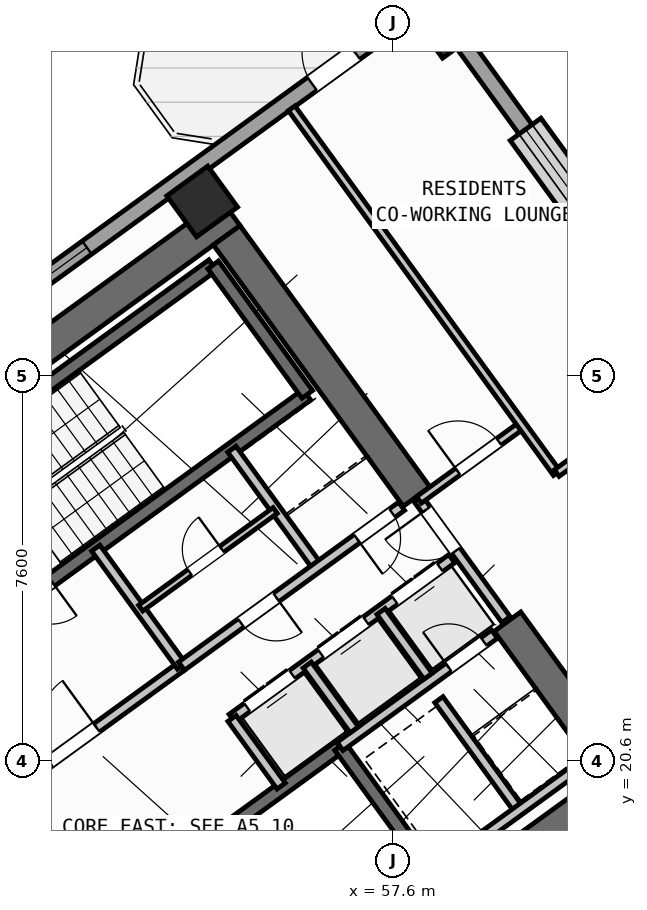
"""IFC4 building model, lengths in metres.
Left out: names, types, materials, properties, quantities, classifications, styles, units other than length and angle.
Written with IfcOpenShell. Run it as: python <this file> out.ifc"""

import sys

from ifc_helpers import new_model, si_unit, direction, frame, frame_2d, origin, origin_2d, place, context, subcontext, project, spatial, rectangle, hollow_rectangle, extrude, source, transform, mapped, element, fill, save


model = new_model("IFC4")
c1 = context("Model", 3, precision=1e-05, world=origin(), true_north=direction((0.0, 1.0)))
c2 = subcontext(c1, "Body", "Model", "MODEL_VIEW")
j1 = project(units=[si_unit("LENGTHUNIT", "METRE"), si_unit("PLANEANGLEUNIT", "RADIAN")], contexts=[c1])
p1 = place(None, origin())
s1 = spatial("IfcSite", under=j1, at=p1, CompositionType="ELEMENT")
p2 = place(p1, origin())
s2 = spatial("IfcBuilding", under=s1, at=p2, CompositionType="ELEMENT")
p3 = place(p2, frame((0.0, 0.0, 31.2)))
s3 = spatial("IfcBuildingStorey", under=s2, at=p3, CompositionType="ELEMENT", Elevation=31.2)
p4 = place(p3, frame((52.318, 13.11, 0.0), z_axis=(0.0, 0.0, 1.0), x_axis=(0.809019445368, 0.587781878776, 0.0)))
e1 = element("IfcWall", 1, at=p4, inside=s3, PredefinedType="SHEAR", context=c2, shape_type="SweptSolid", body=[
    extrude(rectangle(XDim=12.44, YDim=0.65, at=frame_2d((6.22, 0.0))), origin(), (0.0, 0.0, 1.0), 3.35),
])
p5 = place(p3, frame((44.325, 24.113, 0.0), z_axis=(0.0, 0.0, 1.0), x_axis=(0.809012664862, 0.58779121131, 0.0)))
e2 = element("IfcWall", 2, at=p5, inside=s3, PredefinedType="SHEAR", context=c2, shape_type="SweptSolid", body=[
    extrude(rectangle(XDim=12.44, YDim=0.65, at=frame_2d((6.22, 0.0))), origin(), (0.0, 0.0, 1.0), 3.35),
])
p6 = place(p3, frame((61.929, 20.494, 0.0), z_axis=(0.0, 0.0, 1.0), x_axis=(-0.58782982593, 0.808984607855, 0.0)))
e3 = element("IfcWall", 3, at=p6, inside=s3, PredefinedType="SHEAR", context=c2, shape_type="SweptSolid", body=[
    extrude(rectangle(XDim=3.525, YDim=0.65, at=frame_2d((1.762, 0.0))), origin(), (0.0, 0.0, 1.0), 3.35),
])
p7 = place(p3, frame((58.064, 25.813, 0.0), z_axis=(0.0, 0.0, 1.0), x_axis=(-0.58777996584, 0.809020835181, 0.0)))
e4 = element("IfcWall", 4, at=p7, inside=s3, PredefinedType="SHEAR", context=c2, shape_type="SweptSolid", body=[
    extrude(rectangle(XDim=6.375, YDim=0.65, at=frame_2d((3.188, 0.0))), origin(), (0.0, 0.0, 1.0), 3.35),
])
m1 = source(origin(), c2, "Body", "SweptSolid", [
    extrude(hollow_rectangle(XDim=1.0, YDim=1.0, WallThickness=0.04, at=origin_2d()), origin(), (0.0, 0.0, 1.0), 3.6),
])
for number, where, z_axis, x_axis in (
    (5, (53.832, 31.638, 0.0), (0.0, 0.0, 1.0), (0.809, 0.588, 0.0)),
    (6, (58.686, 35.165, 0.0), (0.0, 0.0, 1.0), (0.809, 0.588, 0.0)),
):
    element("IfcColumn", number, at=place(p3, frame(where, z_axis=z_axis, x_axis=x_axis)), inside=s3, PredefinedType="COLUMN", context=c2, shape_type="MappedRepresentation", body=[
        mapped(m1, transform((0.0, 0.0, 0.0), scale=1.0)),
    ])
p8 = place(p3, frame((43.938, 25.192, 0.0), z_axis=(0.0, 0.0, 1.0), x_axis=(0.809016324578, 0.587786174187, 0.0)))
e7 = element("IfcWall", 7, at=p8, inside=s3, PredefinedType="STANDARD", context=c2, shape_type="SweptSolid", body=[
    extrude(rectangle(XDim=17.587, YDim=0.32, at=frame_2d((8.794, 0.0))), origin(), (0.0, 0.0, 1.0), 3.35),
])
p9 = place(p8, frame((14.914, 0.0, 0.0)))
e8 = element("IfcOpeningElement", 8, at=p9, cuts=e7, PredefinedType="OPENING", context=c2, shape_type="SweptSolid", body=[
    extrude(rectangle(XDim=1.05, YDim=2.15, at=frame_2d((0.525, 1.075))), frame((0.0, 0.17, 0.0), z_axis=(0.0, -1.0, 0.0), x_axis=(1.0, 0.0, 0.0)), (0.0, 0.0, 1.0), 0.34),
])
p10 = place(p8, frame((2.169, 0.0, 0.8)))
e9 = element("IfcOpeningElement", 9, at=p10, cuts=e7, PredefinedType="OPENING", context=c2, shape_type="SweptSolid", body=[
    extrude(rectangle(XDim=2.1, YDim=1.55, at=frame_2d((1.05, 0.775))), frame((0.0, 0.17, 0.0), z_axis=(0.0, -1.0, 0.0), x_axis=(1.0, 0.0, 0.0)), (0.0, 0.0, 1.0), 0.34),
])
p11 = place(p8, frame((7.319, 0.0, 0.8)))
e10 = element("IfcOpeningElement", 10, at=p11, cuts=e7, PredefinedType="OPENING", context=c2, shape_type="SweptSolid", body=[
    extrude(rectangle(XDim=2.1, YDim=1.55, at=frame_2d((1.05, 0.775))), frame((0.0, 0.17, 0.0), z_axis=(0.0, -1.0, 0.0), x_axis=(1.0, 0.0, 0.0)), (0.0, 0.0, 1.0), 0.34),
])
p12 = place(p3, frame((58.455, 35.484, 0.0), z_axis=(0.0, 0.0, 1.0), x_axis=(0.587783625747, -0.809018176127, 0.0)))
e11 = element("IfcWall", 11, at=p12, inside=s3, PredefinedType="STANDARD", context=c2, shape_type="SweptSolid", body=[
    extrude(rectangle(XDim=21.587, YDim=0.32, at=frame_2d((10.794, 0.0))), origin(), (0.0, 0.0, 1.0), 2.725),
])
p13 = place(p12, frame((2.994, 0.0, 0.8)))
e12 = element("IfcOpeningElement", 12, at=p13, cuts=e11, PredefinedType="OPENING", context=c2, shape_type="SweptSolid", body=[
    extrude(rectangle(XDim=2.1, YDim=1.55, at=frame_2d((1.05, 0.775))), frame((0.0, 0.17, 0.0), z_axis=(0.0, -1.0, 0.0), x_axis=(1.0, 0.0, 0.0)), (0.0, 0.0, 1.0), 0.34),
])
p14 = place(p12, frame((11.934, 0.0, 0.85)))
e13 = element("IfcOpeningElement", 13, at=p14, cuts=e11, PredefinedType="OPENING", context=c2, shape_type="SweptSolid", body=[
    extrude(rectangle(XDim=1.8, YDim=1.5, at=frame_2d((0.9, 0.75))), frame((0.0, 0.17, 0.0), z_axis=(0.0, -1.0, 0.0), x_axis=(1.0, 0.0, 0.0)), (0.0, 0.0, 1.0), 0.34),
])
p15 = place(p12, frame((18.535, 0.0, 0.85)))
e14 = element("IfcOpeningElement", 14, at=p15, cuts=e11, PredefinedType="OPENING", context=c2, shape_type="SweptSolid", body=[
    extrude(rectangle(XDim=1.5, YDim=1.5, at=frame_2d((0.75, 0.75))), frame((0.0, 0.17, 0.0), z_axis=(0.0, -1.0, 0.0), x_axis=(1.0, 0.0, 0.0)), (0.0, 0.0, 1.0), 0.34),
])
p16 = place(p3, frame((48.006, 25.996, 0.0), z_axis=(0.0, 0.0, 1.0), x_axis=(0.80901903764, 0.587782439969, 0.0)))
e15 = element("IfcWall", 15, at=p16, inside=s3, PredefinedType="SHEAR", context=c2, shape_type="SweptSolid", body=[
    extrude(rectangle(XDim=7.46, YDim=0.26, at=frame_2d((3.73, 0.0))), origin(), (0.0, 0.0, 1.0), 3.35),
])
p17 = place(p3, frame((49.863, 23.44, 0.0), z_axis=(0.0, 0.0, 1.0), x_axis=(0.809003474932, 0.587803859759, 0.0)))
e16 = element("IfcWall", 16, at=p17, inside=s3, PredefinedType="SHEAR", context=c2, shape_type="SweptSolid", body=[
    extrude(rectangle(XDim=7.46, YDim=0.26, at=frame_2d((3.73, 0.0))), origin(), (0.0, 0.0, 1.0), 3.35),
])
p18 = place(p17, frame((0.36, 0.0, 0.0)))
e17 = element("IfcOpeningElement", 17, at=p18, cuts=e16, PredefinedType="OPENING", context=c2, shape_type="SweptSolid", body=[
    extrude(rectangle(XDim=0.86, YDim=2.05, at=frame_2d((0.43, 1.025))), frame((0.0, 0.14, 0.0), z_axis=(0.0, -1.0, 0.0), x_axis=(1.0, 0.0, 0.0)), (0.0, 0.0, 1.0), 0.28),
])
p19 = place(p3, frame((55.906, 27.831, 0.0), z_axis=(0.0, 0.0, 1.0), x_axis=(-0.587804123638, 0.809003283204, 0.0)))
e18 = element("IfcWall", 18, at=p19, inside=s3, PredefinedType="SHEAR", context=c2, shape_type="SweptSolid", body=[
    extrude(rectangle(XDim=3.16, YDim=0.26, at=frame_2d((1.58, 0.0))), origin(), (0.0, 0.0, 1.0), 3.35),
])
p20 = place(p3, frame((50.615, 16.57, 0.0), z_axis=(0.0, 0.0, 1.0), x_axis=(0.809028366311, 0.587769599847, 0.0)))
e19 = element("IfcWall", 19, at=p20, inside=s3, PredefinedType="SHEAR", context=c2, shape_type="SweptSolid", body=[
    extrude(rectangle(XDim=7.33, YDim=0.26, at=frame_2d((3.665, 0.0))), origin(), (0.0, 0.0, 1.0), 3.35),
])
p21 = place(p20, frame((0.22, 0.0, 0.0)))
e20 = element("IfcOpeningElement", 20, at=p21, cuts=e19, PredefinedType="OPENING", context=c2, shape_type="SweptSolid", body=[
    extrude(rectangle(XDim=1.1, YDim=2.1, at=frame_2d((0.55, 1.05))), frame((0.0, 0.14, 0.0), z_axis=(0.0, -1.0, 0.0), x_axis=(1.0, 0.0, 0.0)), (0.0, 0.0, 1.0), 0.28),
])
p22 = place(p3, frame((58.41, 18.327, 0.0), z_axis=(0.0, 0.0, 1.0), x_axis=(-0.58776738483, 0.809029975545, 0.0)))
e21 = element("IfcWall", 21, at=p22, inside=s3, PredefinedType="SHEAR", context=c2, shape_type="SweptSolid", body=[
    extrude(rectangle(XDim=3.16, YDim=0.26, at=frame_2d((1.58, 0.0))), origin(), (0.0, 0.0, 1.0), 3.35),
])
p23 = place(p3, frame((48.799, 19.107, 0.0), z_axis=(0.0, 0.0, 1.0), x_axis=(0.809012959416, 0.587790805897, 0.0)))
e22 = element("IfcWall", 22, at=p23, inside=s3, PredefinedType="STANDARD", context=c2, shape_type="SweptSolid", body=[
    extrude(rectangle(XDim=5.718, YDim=0.2, at=frame_2d((2.859, 0.0))), origin(), (0.0, 0.0, 1.0), 3.34),
])
p24 = place(p23, frame((2.498, 0.0, 0.0)))
e23 = element("IfcOpeningElement", 23, at=p24, cuts=e22, PredefinedType="OPENING", context=c2, shape_type="SweptSolid", body=[
    extrude(rectangle(XDim=1.15, YDim=2.1, at=frame_2d((0.575, 1.05))), frame((0.0, 0.11, 0.0), z_axis=(0.0, -1.0, 0.0), x_axis=(1.0, 0.0, 0.0)), (0.0, 0.0, 1.0), 0.22),
])
p25 = place(p3, frame((56.553, 20.884, 0.0), z_axis=(0.0, 0.0, 1.0), x_axis=(0.809035789462, 0.587759382205, 0.0)))
e24 = element("IfcWall", 24, at=p25, inside=s3, PredefinedType="STANDARD", context=c2, shape_type="SweptSolid", body=[
    extrude(rectangle(XDim=3.768, YDim=0.2, at=frame_2d((1.884, 0.0))), origin(), (0.0, 0.0, 1.0), 3.34),
])
p26 = place(p25, frame((2.65, 0.0, 0.0)))
e25 = element("IfcOpeningElement", 25, at=p26, cuts=e24, PredefinedType="OPENING", context=c2, shape_type="SweptSolid", body=[
    extrude(rectangle(XDim=0.86, YDim=2.05, at=frame_2d((0.43, 1.025))), frame((0.0, 0.11, 0.0), z_axis=(0.0, -1.0, 0.0), x_axis=(1.0, 0.0, 0.0)), (0.0, 0.0, 1.0), 0.22),
])
p27 = place(p3, frame((54.421, 21.436, 0.0), z_axis=(0.0, 0.0, 1.0), x_axis=(0.809013710463, 0.587789772183, 0.0)))
e26 = element("IfcWall", 26, at=p27, inside=s3, PredefinedType="STANDARD", context=c2, shape_type="SweptSolid", body=[
    extrude(rectangle(XDim=5.36, YDim=0.2, at=frame_2d((2.68, 0.0))), origin(), (0.0, 0.0, 1.0), 3.34),
])
p28 = place(p27, frame((0.37, 0.0, 0.0)))
e27 = element("IfcOpeningElement", 27, at=p28, cuts=e26, PredefinedType="OPENING", context=c2, shape_type="SweptSolid", body=[
    extrude(rectangle(XDim=1.1, YDim=2.15, at=frame_2d((0.55, 1.075))), frame((0.0, 0.11, 0.0), z_axis=(0.0, -1.0, 0.0), x_axis=(1.0, 0.0, 0.0)), (0.0, 0.0, 1.0), 0.22),
])
p29 = place(p27, frame((2.17, 0.0, 0.0)))
e28 = element("IfcOpeningElement", 28, at=p29, cuts=e26, PredefinedType="OPENING", context=c2, shape_type="SweptSolid", body=[
    extrude(rectangle(XDim=1.1, YDim=2.15, at=frame_2d((0.55, 1.075))), frame((0.0, 0.11, 0.0), z_axis=(0.0, -1.0, 0.0), x_axis=(1.0, 0.0, 0.0)), (0.0, 0.0, 1.0), 0.22),
])
p30 = place(p27, frame((3.97, 0.0, 0.0)))
e29 = element("IfcOpeningElement", 29, at=p30, cuts=e26, PredefinedType="OPENING", context=c2, shape_type="SweptSolid", body=[
    extrude(rectangle(XDim=1.1, YDim=2.15, at=frame_2d((0.55, 1.075))), frame((0.0, 0.11, 0.0), z_axis=(0.0, -1.0, 0.0), x_axis=(1.0, 0.0, 0.0)), (0.0, 0.0, 1.0), 0.22),
])
p31 = place(p3, frame((55.391, 20.102, 0.0), z_axis=(0.0, 0.0, 1.0), x_axis=(-0.58778447739, 0.809017557374, 0.0)))
e30 = element("IfcWall", 30, at=p31, inside=s3, PredefinedType="STANDARD", context=c2, shape_type="SweptSolid", body=[
    extrude(rectangle(XDim=1.65, YDim=0.2, at=frame_2d((0.825, 0.0))), origin(), (0.0, 0.0, 1.0), 3.34),
])
p32 = place(p3, frame((56.834, 21.212, 0.0), z_axis=(0.0, 0.0, 1.0), x_axis=(-0.58776738483, 0.809029975545, 0.0)))
e31 = element("IfcWall", 31, at=p32, inside=s3, PredefinedType="STANDARD", context=c2, shape_type="SweptSolid", body=[
    extrude(rectangle(XDim=1.58, YDim=0.2, at=frame_2d((0.79, 0.0))), origin(), (0.0, 0.0, 1.0), 3.34),
])
p33 = place(p3, frame((58.29, 22.27, 0.0), z_axis=(0.0, 0.0, 1.0), x_axis=(-0.587840865826, 0.808976585857, 0.0)))
e32 = element("IfcWall", 32, at=p33, inside=s3, PredefinedType="STANDARD", context=c2, shape_type="SweptSolid", body=[
    extrude(rectangle(XDim=1.58, YDim=0.2, at=frame_2d((0.79, 0.0))), origin(), (0.0, 0.0, 1.0), 3.34),
])
p34 = place(p3, frame((60.067, 19.655, 0.0), z_axis=(0.0, 0.0, 1.0), x_axis=(-0.587800520745, 0.809005900975, 0.0)))
e33 = element("IfcWall", 33, at=p34, inside=s3, PredefinedType="STANDARD", context=c2, shape_type="SweptSolid", body=[
    extrude(rectangle(XDim=2.66, YDim=0.2, at=frame_2d((1.33, 0.0))), origin(), (0.0, 0.0, 1.0), 3.34),
])
p35 = place(p3, frame((58.472, 18.447, 0.0), z_axis=(0.0, 0.0, 1.0), x_axis=(0.809022487728, 0.587777691266, 0.0)))
e34 = element("IfcWall", 34, at=p35, inside=s3, PredefinedType="STANDARD", context=c2, shape_type="SweptSolid", body=[
    extrude(rectangle(XDim=3.648, YDim=0.2, at=frame_2d((1.824, 0.0))), origin(), (0.0, 0.0, 1.0), 3.34),
])
p36 = place(p3, frame((53.425, 22.468, 0.0), z_axis=(0.0, 0.0, 1.0), x_axis=(-0.5877230039, 0.809062216821, 0.0)))
e35 = element("IfcWall", 35, at=p36, inside=s3, PredefinedType="STANDARD", context=c2, shape_type="SweptSolid", body=[
    extrude(rectangle(XDim=2.88, YDim=0.2, at=frame_2d((1.44, 0.0))), origin(), (0.0, 0.0, 1.0), 3.34),
])
p37 = place(p3, frame((56.111, 24.419, 0.0), z_axis=(0.0, 0.0, 1.0), x_axis=(-0.58777848983, 0.809021907548, 0.0)))
e36 = element("IfcWall", 36, at=p37, inside=s3, PredefinedType="STANDARD", context=c2, shape_type="SweptSolid", body=[
    extrude(rectangle(XDim=2.88, YDim=0.2, at=frame_2d((1.44, 0.0))), origin(), (0.0, 0.0, 1.0), 3.34),
])
p38 = place(p3, frame((53.425, 22.468, 0.0), z_axis=(0.0, 0.0, 1.0), x_axis=(0.80902705128, 0.587771409902, 0.0)))
e37 = element("IfcWall", 37, at=p38, inside=s3, PredefinedType="STANDARD", context=c2, shape_type="SweptSolid", body=[
    extrude(rectangle(XDim=5.368, YDim=0.2, at=frame_2d((2.684, 0.0))), origin(), (0.0, 0.0, 1.0), 3.34),
])
p39 = place(p38, frame((4.28, 0.0, 0.0)))
e38 = element("IfcOpeningElement", 38, at=p39, cuts=e37, PredefinedType="OPENING", context=c2, shape_type="SweptSolid", body=[
    extrude(rectangle(XDim=0.86, YDim=2.05, at=frame_2d((0.43, 1.025))), frame((0.0, 0.11, 0.0), z_axis=(0.0, -1.0, 0.0), x_axis=(1.0, 0.0, 0.0)), (0.0, 0.0, 1.0), 0.22),
])
p40 = place(p38, frame((1.45, 0.0, 0.0)))
e39 = element("IfcOpeningElement", 39, at=p40, cuts=e37, PredefinedType="OPENING", context=c2, shape_type="SweptSolid", body=[
    extrude(rectangle(XDim=0.86, YDim=2.05, at=frame_2d((0.43, 1.025))), frame((0.0, 0.11, 0.0), z_axis=(0.0, -1.0, 0.0), x_axis=(1.0, 0.0, 0.0)), (0.0, 0.0, 1.0), 0.22),
])
p41 = place(p3, frame((52.618, 23.612, 0.0), z_axis=(0.0, 0.0, 1.0), x_axis=(0.809009587469, 0.587795446889, 0.0)))
e40 = element("IfcWall", 40, at=p41, inside=s3, PredefinedType="PLUMBINGWALL", context=c2, shape_type="SweptSolid", body=[
    extrude(rectangle(XDim=3.28, YDim=0.14, at=frame_2d((1.64, 0.0))), origin(), (0.0, 0.0, 1.0), 3.34),
])
p42 = place(p41, frame((1.2, 0.0, 0.0)))
e41 = element("IfcOpeningElement", 41, at=p42, cuts=e40, PredefinedType="OPENING", context=c2, shape_type="SweptSolid", body=[
    extrude(rectangle(XDim=0.78, YDim=2.05, at=frame_2d((0.39, 1.025))), frame((0.0, 0.08, 0.0), z_axis=(0.0, -1.0, 0.0), x_axis=(1.0, 0.0, 0.0)), (0.0, 0.0, 1.0), 0.16),
])
p43 = place(p3, frame((59.827, 23.386, 0.0), z_axis=(0.0, 0.0, 1.0), x_axis=(-0.587803840107, 0.809003489211, 0.0)))
e42 = element("IfcWall", 42, at=p43, inside=s3, PredefinedType="STANDARD", context=c2, shape_type="SweptSolid", body=[
    extrude(rectangle(XDim=2.96, YDim=0.2, at=frame_2d((1.48, 0.0))), origin(), (0.0, 0.0, 1.0), 3.34),
])
p44 = place(p43, frame((1.68, 0.0, 0.0)))
e43 = element("IfcOpeningElement", 43, at=p44, cuts=e42, PredefinedType="OPENING", context=c2, shape_type="SweptSolid", body=[
    extrude(rectangle(XDim=1.0, YDim=2.1, at=frame_2d((0.5, 1.05))), frame((0.0, 0.11, 0.0), z_axis=(0.0, -1.0, 0.0), x_axis=(1.0, 0.0, 0.0)), (0.0, 0.0, 1.0), 0.22),
])
p45 = place(p3, frame((58.111, 25.749, 0.0), z_axis=(0.0, 0.0, 1.0), x_axis=(0.809000999347, 0.58780726693, 0.0)))
e44 = element("IfcWall", 44, at=p45, inside=s3, PredefinedType="PARTITIONING", context=c2, shape_type="SweptSolid", body=[
    extrude(rectangle(XDim=2.51, YDim=0.16, at=frame_2d((1.255, 0.0))), origin(), (0.0, 0.0, 1.0), 2.725),
])
p46 = place(p45, frame((0.95, 0.0, 0.0)))
e45 = element("IfcOpeningElement", 45, at=p46, cuts=e44, PredefinedType="OPENING", context=c2, shape_type="SweptSolid", body=[
    extrude(rectangle(XDim=1.0, YDim=2.1, at=frame_2d((0.5, 1.05))), frame((0.0, 0.09, 0.0), z_axis=(0.0, -1.0, 0.0), x_axis=(1.0, 0.0, 0.0)), (0.0, 0.0, 1.0), 0.18),
])
p47 = place(p3, frame((60.829, 26.278, 0.0), z_axis=(0.0, 0.0, 1.0), x_axis=(-0.587781800813, 0.80901950201, 0.0)))
e46 = element("IfcWall", 46, at=p47, inside=s3, PredefinedType="PARTITIONING", context=c2, shape_type="SweptSolid", body=[
    extrude(rectangle(XDim=8.9, YDim=0.16, at=frame_2d((4.45, 0.0))), origin(), (0.0, 0.0, 1.0), 3.34),
])
p48 = place(p3, frame((60.829, 26.278, 0.0), z_axis=(0.0, 0.0, 1.0), x_axis=(0.809003564202, 0.587803736896, 0.0)))
e47 = element("IfcWall", 47, at=p48, inside=s3, PredefinedType="PARTITIONING", context=c2, shape_type="SweptSolid", body=[
    extrude(rectangle(XDim=3.63, YDim=0.16, at=frame_2d((1.815, 0.0))), origin(), (0.0, 0.0, 1.0), 3.34),
])
p49 = place(p48, frame((1.305, 0.0, 0.0)))
e48 = element("IfcOpeningElement", 48, at=p49, cuts=e47, PredefinedType="OPENING", context=c2, shape_type="SweptSolid", body=[
    extrude(rectangle(XDim=1.0, YDim=2.1, at=frame_2d((0.5, 1.05))), frame((0.0, 0.09, 0.0), z_axis=(0.0, -1.0, 0.0), x_axis=(1.0, 0.0, 0.0)), (0.0, 0.0, 1.0), 0.18),
])
p50 = place(p3, frame((53.705, 11.126, 0.0), z_axis=(0.0, 0.0, 1.0), x_axis=(0.809014504436, 0.587788679384, 0.0)))
e49 = element("IfcWall", 49, at=p50, inside=s3, PredefinedType="PARTITIONING", context=c2, shape_type="SweptSolid", body=[
    extrude(rectangle(XDim=14.67, YDim=0.16, at=frame_2d((7.335, 0.0))), origin(), (0.0, 0.0, 1.0), 3.34),
])
p51 = place(p50, frame((10.2, 0.0, 0.0)))
e50 = element("IfcOpeningElement", 50, at=p51, cuts=e49, PredefinedType="OPENING", context=c2, shape_type="SweptSolid", body=[
    extrude(rectangle(XDim=1.0, YDim=2.1, at=frame_2d((0.5, 1.05))), frame((0.0, 0.09, 0.0), z_axis=(0.0, -1.0, 0.0), x_axis=(1.0, 0.0, 0.0)), (0.0, 0.0, 1.0), 0.18),
])
m2 = source(origin(), c2, "Body", "SweptSolid", [
    extrude(rectangle(XDim=1.05, YDim=2.15, at=frame_2d((0.525, 1.075))), frame((0.0, 0.025, 0.0), z_axis=(0.0, -1.0, 0.0), x_axis=(1.0, 0.0, 0.0)), (0.0, 0.0, 1.0), 0.05),
])
p52 = place(p9, origin())
e51 = element("IfcDoor", 51, at=p52, inside=s3, OperationType="SINGLE_SWING_RIGHT", PredefinedType="DOOR", context=c2, shape_type="MappedRepresentation", body=[
    mapped(m2, transform((0.0, 0.0, 0.0), scale=1.0)),
])
fill(e8, e51)
m3 = source(origin(), c2, "Body", "SweptSolid", [
    extrude(rectangle(XDim=2.1, YDim=1.55, at=frame_2d((1.05, 0.775))), frame((0.0, 0.03, 0.0), z_axis=(0.0, -1.0, 0.0), x_axis=(1.0, 0.0, 0.0)), (0.0, 0.0, 1.0), 0.06),
])
p53 = place(p11, origin())
e52 = element("IfcWindow", 52, at=p53, inside=s3, PartitioningType="SINGLE_PANEL", PredefinedType="WINDOW", context=c2, shape_type="MappedRepresentation", body=[
    mapped(m3, transform((0.0, 0.0, 0.0), scale=1.0)),
])
fill(e10, e52)
p54 = place(p13, origin())
e53 = element("IfcWindow", 53, at=p54, inside=s3, PartitioningType="SINGLE_PANEL", PredefinedType="WINDOW", context=c2, shape_type="MappedRepresentation", body=[
    mapped(m3, transform((0.0, 0.0, 0.0), scale=1.0)),
])
fill(e12, e53)
m4 = source(origin(), c2, "Body", "SweptSolid", [
    extrude(rectangle(XDim=1.15, YDim=2.1, at=frame_2d((0.575, 1.05))), frame((0.0, 0.025, 0.0), z_axis=(0.0, -1.0, 0.0), x_axis=(1.0, 0.0, 0.0)), (0.0, 0.0, 1.0), 0.05),
])
p55 = place(p24, origin())
e54 = element("IfcDoor", 54, at=p55, inside=s3, OperationType="SINGLE_SWING_RIGHT", PredefinedType="DOOR", context=c2, shape_type="MappedRepresentation", body=[
    mapped(m4, transform((0.0, 0.0, 0.0), scale=1.0)),
])
fill(e23, e54)
m5 = source(origin(), c2, "Body", "SweptSolid", [
    extrude(rectangle(XDim=1.1, YDim=2.15, at=frame_2d((0.55, 1.075))), frame((0.0, 0.025, 0.0), z_axis=(0.0, -1.0, 0.0), x_axis=(1.0, 0.0, 0.0)), (0.0, 0.0, 1.0), 0.05),
])
p56 = place(p28, origin())
e55 = element("IfcDoor", 55, at=p56, inside=s3, OperationType="DOUBLE_DOOR_SLIDING", PredefinedType="DOOR", context=c2, shape_type="MappedRepresentation", body=[
    mapped(m5, transform((0.0, 0.0, 0.0), scale=1.0)),
])
fill(e27, e55)
p57 = place(p29, origin())
e56 = element("IfcDoor", 56, at=p57, inside=s3, OperationType="DOUBLE_DOOR_SLIDING", PredefinedType="DOOR", context=c2, shape_type="MappedRepresentation", body=[
    mapped(m5, transform((0.0, 0.0, 0.0), scale=1.0)),
])
fill(e28, e56)
p58 = place(p30, origin())
e57 = element("IfcDoor", 57, at=p58, inside=s3, OperationType="DOUBLE_DOOR_SLIDING", PredefinedType="DOOR", context=c2, shape_type="MappedRepresentation", body=[
    mapped(m5, transform((0.0, 0.0, 0.0), scale=1.0)),
])
fill(e29, e57)
m6 = source(origin(), c2, "Body", "SweptSolid", [
    extrude(rectangle(XDim=0.86, YDim=2.05, at=frame_2d((0.43, 1.025))), frame((0.0, 0.025, 0.0), z_axis=(0.0, -1.0, 0.0), x_axis=(1.0, 0.0, 0.0)), (0.0, 0.0, 1.0), 0.05),
])
p59 = place(p26, origin())
e58 = element("IfcDoor", 58, at=p59, inside=s3, OperationType="SINGLE_SWING_LEFT", PredefinedType="DOOR", context=c2, shape_type="MappedRepresentation", body=[
    mapped(m6, transform((0.0, 0.0, 0.0), scale=1.0)),
])
fill(e25, e58)
p60 = place(p39, frame((0.86, 0.0, 0.0), z_axis=(0.0, 0.0, 1.0), x_axis=(-1.0, 0.0, 0.0)))
e59 = element("IfcDoor", 59, at=p60, inside=s3, OperationType="SINGLE_SWING_RIGHT", PredefinedType="DOOR", context=c2, shape_type="MappedRepresentation", body=[
    mapped(m6, transform((0.0, 0.0, 0.0), scale=1.0)),
])
fill(e38, e59)
p61 = place(p40, frame((0.86, 0.0, 0.0), z_axis=(0.0, 0.0, 1.0), x_axis=(-1.0, 0.0, 0.0)))
e60 = element("IfcDoor", 60, at=p61, inside=s3, OperationType="SINGLE_SWING_LEFT", PredefinedType="DOOR", context=c2, shape_type="MappedRepresentation", body=[
    mapped(m6, transform((0.0, 0.0, 0.0), scale=1.0)),
])
fill(e39, e60)
m7 = source(origin(), c2, "Body", "SweptSolid", [
    extrude(rectangle(XDim=0.78, YDim=2.05, at=frame_2d((0.39, 1.025))), frame((0.0, 0.025, 0.0), z_axis=(0.0, -1.0, 0.0), x_axis=(1.0, 0.0, 0.0)), (0.0, 0.0, 1.0), 0.05),
])
p62 = place(p42, origin())
e61 = element("IfcDoor", 61, at=p62, inside=s3, OperationType="SINGLE_SWING_RIGHT", PredefinedType="DOOR", context=c2, shape_type="MappedRepresentation", body=[
    mapped(m7, transform((0.0, 0.0, 0.0), scale=1.0)),
])
fill(e41, e61)
m8 = source(origin(), c2, "Body", "SweptSolid", [
    extrude(rectangle(XDim=1.0, YDim=2.1, at=frame_2d((0.5, 1.05))), frame((0.0, 0.025, 0.0), z_axis=(0.0, -1.0, 0.0), x_axis=(1.0, 0.0, 0.0)), (0.0, 0.0, 1.0), 0.05),
])
p63 = place(p46, origin())
e62 = element("IfcDoor", 62, at=p63, inside=s3, OperationType="SINGLE_SWING_LEFT", PredefinedType="DOOR", context=c2, shape_type="MappedRepresentation", body=[
    mapped(m8, transform((0.0, 0.0, 0.0), scale=1.0)),
])
fill(e45, e62)
p64 = place(p44, origin())
e63 = element("IfcDoor", 63, at=p64, inside=s3, OperationType="SINGLE_SWING_RIGHT", PredefinedType="DOOR", context=c2, shape_type="MappedRepresentation", body=[
    mapped(m8, transform((0.0, 0.0, 0.0), scale=1.0)),
])
fill(e43, e63)
save(model, sys.argv[1])
